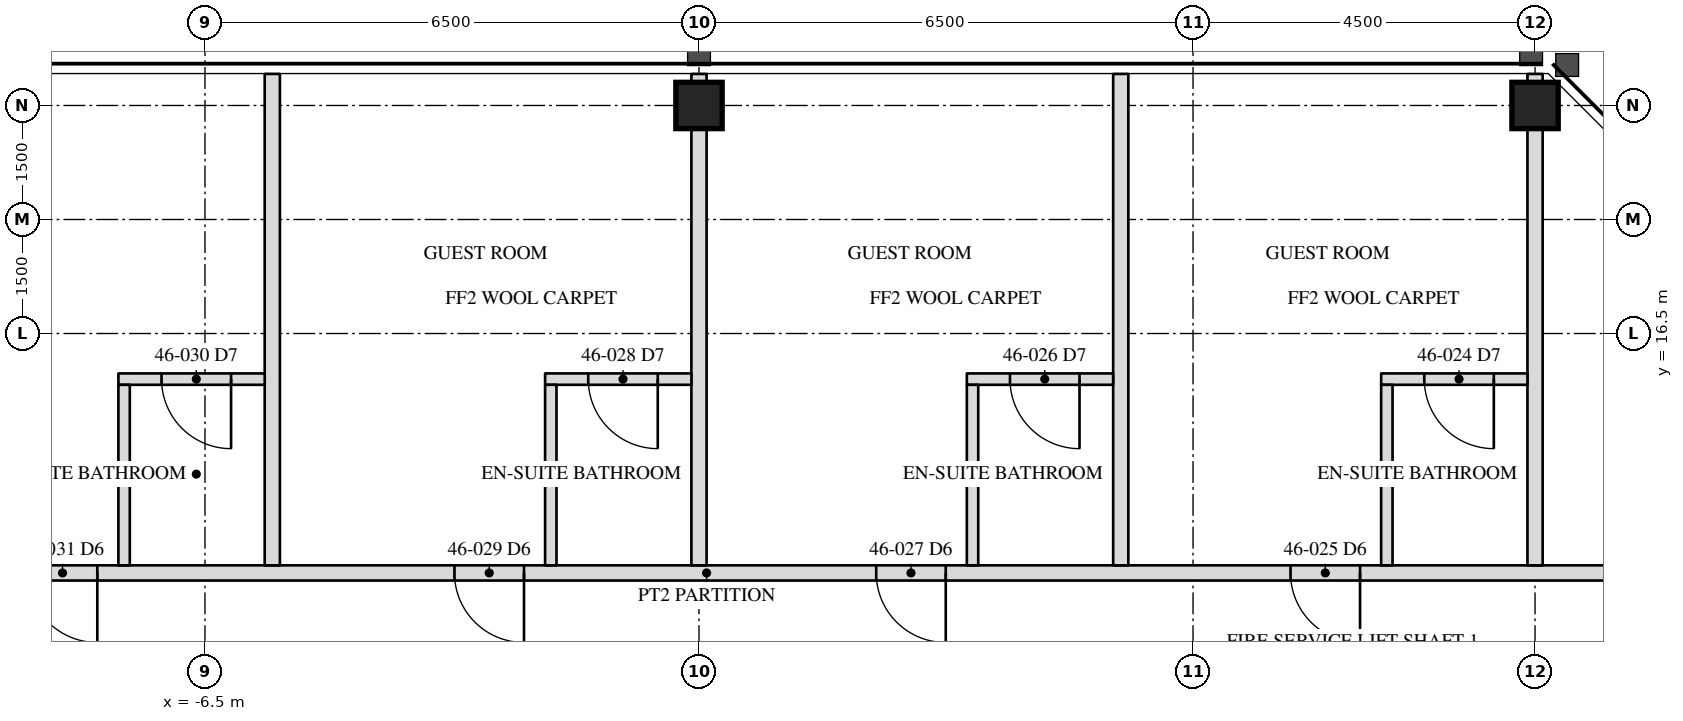
"""IFC4 building model, lengths in metres.
Left out: names, types, materials, properties, quantities, classifications, styles, units other than length and angle.
Written with IfcOpenShell. Run it as: python <this file> out.ifc"""

import sys

from ifc_helpers import new_model, si_unit, direction, frame, frame_2d, origin, origin_2d, place, context, subcontext, project, spatial, rectangle, hollow_rectangle, extrude, element, fill, save


model = new_model("IFC4")
c1 = context("Model", 3, precision=1e-05, world=origin(), true_north=direction((0.0, 1.0)))
c2 = subcontext(c1, "Body", "Model", "MODEL_VIEW")
j1 = project(units=[si_unit("LENGTHUNIT", "METRE"), si_unit("PLANEANGLEUNIT", "RADIAN")], contexts=[c1])
p1 = place(None, origin())
s1 = spatial("IfcSite", under=j1, at=p1, CompositionType="ELEMENT")
p2 = place(p1, origin())
s2 = spatial("IfcBuilding", under=s1, at=p2, CompositionType="ELEMENT")
p3 = place(p2, frame((0.0, 0.0, 197.7)))
s3 = spatial("IfcBuildingStorey", under=s2, at=p3, CompositionType="ELEMENT", Elevation=197.7)
for number, where, z_axis, x_axis in (
    (1, (11.0, 19.5, 0.0), (0.0, 0.0, 1.0), (1.0, 0.0, 0.0)),
    (2, (0.0, 19.5, 0.0), (0.0, 0.0, 1.0), (1.0, 0.0, 0.0)),
):
    element("IfcColumn", number, at=place(p3, frame(where, z_axis=z_axis, x_axis=x_axis)), inside=s3, PredefinedType="COLUMN", context=c2, shape_type="SweptSolid", body=[
        extrude(hollow_rectangle(XDim=0.61, YDim=0.61, WallThickness=0.076, at=origin_2d()), origin(), (0.0, 0.0, 1.0), 3.5),
    ])
p4 = place(p3, frame((13.45, 13.35, 0.0), z_axis=(0.0, 0.0, 1.0), x_axis=(-1.0, 0.0, 0.0)))
e3 = element("IfcWall", 3, at=p4, inside=s3, PredefinedType="PARTITIONING", context=c2, shape_type="SweptSolid", body=[
    extrude(rectangle(XDim=26.7, YDim=0.2, at=frame_2d((13.35, 0.0))), origin(), (0.0, 0.0, 1.0), 3.31),
])
p5 = place(p4, frame((4.752, 0.0, 0.0)))
e4 = element("IfcOpeningElement", 4, at=p5, cuts=e3, PredefinedType="OPENING", context=c2, shape_type="SweptSolid", body=[
    extrude(rectangle(XDim=0.915, YDim=2.134, at=frame_2d((0.458, 1.067))), frame((0.0, 0.11, 0.0), z_axis=(0.0, -1.0, 0.0), x_axis=(1.0, 0.0, 0.0)), (0.0, 0.0, 1.0), 0.22),
])
p6 = place(p4, frame((10.204, 0.0, 0.0)))
e5 = element("IfcOpeningElement", 5, at=p6, cuts=e3, PredefinedType="OPENING", context=c2, shape_type="SweptSolid", body=[
    extrude(rectangle(XDim=0.915, YDim=2.134, at=frame_2d((0.458, 1.067))), frame((0.0, 0.11, 0.0), z_axis=(0.0, -1.0, 0.0), x_axis=(1.0, 0.0, 0.0)), (0.0, 0.0, 1.0), 0.22),
])
p7 = place(p4, frame((15.752, 0.0, 0.0)))
e6 = element("IfcOpeningElement", 6, at=p7, cuts=e3, PredefinedType="OPENING", context=c2, shape_type="SweptSolid", body=[
    extrude(rectangle(XDim=0.915, YDim=2.134, at=frame_2d((0.458, 1.067))), frame((0.0, 0.11, 0.0), z_axis=(0.0, -1.0, 0.0), x_axis=(1.0, 0.0, 0.0)), (0.0, 0.0, 1.0), 0.22),
])
p8 = place(p4, frame((21.366, 0.0, 0.0)))
e7 = element("IfcOpeningElement", 7, at=p8, cuts=e3, PredefinedType="OPENING", context=c2, shape_type="SweptSolid", body=[
    extrude(rectangle(XDim=0.915, YDim=2.134, at=frame_2d((0.458, 1.067))), frame((0.0, 0.11, 0.0), z_axis=(0.0, -1.0, 0.0), x_axis=(1.0, 0.0, 0.0)), (0.0, 0.0, 1.0), 0.22),
])
p9 = place(p3, frame((11.0, 13.45, 0.0), z_axis=(0.0, 0.0, 1.0), x_axis=(0.0, 1.0, 0.0)))
e8 = element("IfcWall", 8, at=p9, inside=s3, PredefinedType="PARTITIONING", context=c2, shape_type="SweptSolid", body=[
    extrude(rectangle(XDim=6.465, YDim=0.2, at=frame_2d((3.232, 0.0))), origin(), (0.0, 0.0, 1.0), 2.802),
])
p10 = place(p3, frame((5.549, 13.45, 0.0), z_axis=(0.0, 0.0, 1.0), x_axis=(0.0, 1.0, 0.0)))
e9 = element("IfcWall", 9, at=p10, inside=s3, PredefinedType="PARTITIONING", context=c2, shape_type="SweptSolid", body=[
    extrude(rectangle(XDim=6.465, YDim=0.2, at=frame_2d((3.232, 0.0))), origin(), (0.0, 0.0, 1.0), 3.31),
])
p11 = place(p3, frame((0.0, 13.45, 0.0), z_axis=(0.0, 0.0, 1.0), x_axis=(0.0, 1.0, 0.0)))
e10 = element("IfcWall", 10, at=p11, inside=s3, PredefinedType="PARTITIONING", context=c2, shape_type="SweptSolid", body=[
    extrude(rectangle(XDim=6.465, YDim=0.2, at=frame_2d((3.232, 0.0))), origin(), (0.0, 0.0, 1.0), 2.802),
])
p12 = place(p3, frame((-5.614, 13.45, 0.0), z_axis=(0.0, 0.0, 1.0), x_axis=(0.0, 1.0, 0.0)))
e11 = element("IfcWall", 11, at=p12, inside=s3, PredefinedType="PARTITIONING", context=c2, shape_type="SweptSolid", body=[
    extrude(rectangle(XDim=6.465, YDim=0.2, at=frame_2d((3.232, 0.0))), origin(), (0.0, 0.0, 1.0), 3.31),
])
p13 = place(p3, frame((10.9, 15.9, 0.0), z_axis=(0.0, 0.0, 1.0), x_axis=(-1.0, 0.0, 0.0)))
e12 = element("IfcWall", 12, at=p13, inside=s3, PredefinedType="PARTITIONING", context=c2, shape_type="SweptSolid", body=[
    extrude(rectangle(XDim=1.925, YDim=0.15, at=frame_2d((0.962, 0.0))), origin(), (0.0, 0.0, 1.0), 3.31),
])
p14 = place(p13, frame((0.442, 0.0, 0.0)))
e13 = element("IfcOpeningElement", 13, at=p14, cuts=e12, PredefinedType="OPENING", context=c2, shape_type="SweptSolid", body=[
    extrude(rectangle(XDim=0.915, YDim=2.032, at=frame_2d((0.458, 1.016))), frame((0.0, 0.085, 0.0), z_axis=(0.0, -1.0, 0.0), x_axis=(1.0, 0.0, 0.0)), (0.0, 0.0, 1.0), 0.17),
])
p15 = place(p3, frame((9.05, 13.45, 0.0), z_axis=(0.0, 0.0, 1.0), x_axis=(0.0, 1.0, 0.0)))
e14 = element("IfcWall", 14, at=p15, inside=s3, PredefinedType="PARTITIONING", context=c2, shape_type="SweptSolid", body=[
    extrude(rectangle(XDim=2.375, YDim=0.15, at=frame_2d((1.188, 0.0))), origin(), (0.0, 0.0, 1.0), 3.31),
])
p16 = place(p3, frame((5.449, 15.9, 0.0), z_axis=(0.0, 0.0, 1.0), x_axis=(-1.0, 0.0, 0.0)))
e15 = element("IfcWall", 15, at=p16, inside=s3, PredefinedType="PARTITIONING", context=c2, shape_type="SweptSolid", body=[
    extrude(rectangle(XDim=1.925, YDim=0.15, at=frame_2d((0.962, 0.0))), origin(), (0.0, 0.0, 1.0), 3.31),
])
p17 = place(p16, frame((0.442, 0.0, 0.0)))
e16 = element("IfcOpeningElement", 16, at=p17, cuts=e15, PredefinedType="OPENING", context=c2, shape_type="SweptSolid", body=[
    extrude(rectangle(XDim=0.915, YDim=2.032, at=frame_2d((0.458, 1.016))), frame((0.0, 0.085, 0.0), z_axis=(0.0, -1.0, 0.0), x_axis=(1.0, 0.0, 0.0)), (0.0, 0.0, 1.0), 0.17),
])
p18 = place(p3, frame((3.599, 13.45, 0.0), z_axis=(0.0, 0.0, 1.0), x_axis=(0.0, 1.0, 0.0)))
e17 = element("IfcWall", 17, at=p18, inside=s3, PredefinedType="PARTITIONING", context=c2, shape_type="SweptSolid", body=[
    extrude(rectangle(XDim=2.375, YDim=0.15, at=frame_2d((1.188, 0.0))), origin(), (0.0, 0.0, 1.0), 2.703),
])
p19 = place(p3, frame((-0.1, 15.9, 0.0), z_axis=(0.0, 0.0, 1.0), x_axis=(-1.0, 0.0, 0.0)))
e18 = element("IfcWall", 18, at=p19, inside=s3, PredefinedType="PARTITIONING", context=c2, shape_type="SweptSolid", body=[
    extrude(rectangle(XDim=1.925, YDim=0.15, at=frame_2d((0.962, 0.0))), origin(), (0.0, 0.0, 1.0), 3.31),
])
p20 = place(p19, frame((0.442, 0.0, 0.0)))
e19 = element("IfcOpeningElement", 19, at=p20, cuts=e18, PredefinedType="OPENING", context=c2, shape_type="SweptSolid", body=[
    extrude(rectangle(XDim=0.915, YDim=2.032, at=frame_2d((0.458, 1.016))), frame((0.0, 0.085, 0.0), z_axis=(0.0, -1.0, 0.0), x_axis=(1.0, 0.0, 0.0)), (0.0, 0.0, 1.0), 0.17),
])
p21 = place(p3, frame((-1.95, 13.45, 0.0), z_axis=(0.0, 0.0, 1.0), x_axis=(0.0, 1.0, 0.0)))
e20 = element("IfcWall", 20, at=p21, inside=s3, PredefinedType="PARTITIONING", context=c2, shape_type="SweptSolid", body=[
    extrude(rectangle(XDim=2.375, YDim=0.15, at=frame_2d((1.188, 0.0))), origin(), (0.0, 0.0, 1.0), 3.31),
])
p22 = place(p3, frame((-5.714, 15.9, 0.0), z_axis=(0.0, 0.0, 1.0), x_axis=(-1.0, 0.0, 0.0)))
e21 = element("IfcWall", 21, at=p22, inside=s3, PredefinedType="PARTITIONING", context=c2, shape_type="SweptSolid", body=[
    extrude(rectangle(XDim=1.925, YDim=0.15, at=frame_2d((0.962, 0.0))), origin(), (0.0, 0.0, 1.0), 3.31),
])
p23 = place(p22, frame((0.442, 0.0, 0.0)))
e22 = element("IfcOpeningElement", 22, at=p23, cuts=e21, PredefinedType="OPENING", context=c2, shape_type="SweptSolid", body=[
    extrude(rectangle(XDim=0.915, YDim=2.032, at=frame_2d((0.458, 1.016))), frame((0.0, 0.085, 0.0), z_axis=(0.0, -1.0, 0.0), x_axis=(1.0, 0.0, 0.0)), (0.0, 0.0, 1.0), 0.17),
])
p24 = place(p3, frame((-7.564, 13.45, 0.0), z_axis=(0.0, 0.0, 1.0), x_axis=(0.0, 1.0, 0.0)))
e23 = element("IfcWall", 23, at=p24, inside=s3, PredefinedType="PARTITIONING", context=c2, shape_type="SweptSolid", body=[
    extrude(rectangle(XDim=2.375, YDim=0.15, at=frame_2d((1.188, 0.0))), origin(), (0.0, 0.0, 1.0), 3.31),
])
p25 = place(p14, origin())
e24 = element("IfcDoor", 24, at=p25, inside=s3, OperationType="SINGLE_SWING_LEFT", PredefinedType="DOOR", context=c2, shape_type="SweptSolid", body=[
    extrude(rectangle(XDim=0.915, YDim=2.032, at=frame_2d((0.458, 1.016))), frame((0.0, 0.025, 0.0), z_axis=(0.0, -1.0, 0.0), x_axis=(1.0, 0.0, 0.0)), (0.0, 0.0, 1.0), 0.05),
])
fill(e13, e24)
p26 = place(p5, origin())
e25 = element("IfcDoor", 25, at=p26, inside=s3, OperationType="SINGLE_SWING_LEFT", PredefinedType="DOOR", context=c2, shape_type="SweptSolid", body=[
    extrude(rectangle(XDim=0.915, YDim=2.134, at=frame_2d((0.458, 1.067))), frame((0.0, 0.025, 0.0), z_axis=(0.0, -1.0, 0.0), x_axis=(1.0, 0.0, 0.0)), (0.0, 0.0, 1.0), 0.05),
])
fill(e4, e25)
p27 = place(p17, origin())
e26 = element("IfcDoor", 26, at=p27, inside=s3, OperationType="SINGLE_SWING_LEFT", PredefinedType="DOOR", context=c2, shape_type="SweptSolid", body=[
    extrude(rectangle(XDim=0.915, YDim=2.032, at=frame_2d((0.458, 1.016))), frame((0.0, 0.025, 0.0), z_axis=(0.0, -1.0, 0.0), x_axis=(1.0, 0.0, 0.0)), (0.0, 0.0, 1.0), 0.05),
])
fill(e16, e26)
p28 = place(p6, origin())
e27 = element("IfcDoor", 27, at=p28, inside=s3, OperationType="SINGLE_SWING_LEFT", PredefinedType="DOOR", context=c2, shape_type="SweptSolid", body=[
    extrude(rectangle(XDim=0.915, YDim=2.134, at=frame_2d((0.458, 1.067))), frame((0.0, 0.025, 0.0), z_axis=(0.0, -1.0, 0.0), x_axis=(1.0, 0.0, 0.0)), (0.0, 0.0, 1.0), 0.05),
])
fill(e5, e27)
p29 = place(p20, origin())
e28 = element("IfcDoor", 28, at=p29, inside=s3, OperationType="SINGLE_SWING_LEFT", PredefinedType="DOOR", context=c2, shape_type="SweptSolid", body=[
    extrude(rectangle(XDim=0.915, YDim=2.032, at=frame_2d((0.458, 1.016))), frame((0.0, 0.025, 0.0), z_axis=(0.0, -1.0, 0.0), x_axis=(1.0, 0.0, 0.0)), (0.0, 0.0, 1.0), 0.05),
])
fill(e19, e28)
p30 = place(p7, origin())
e29 = element("IfcDoor", 29, at=p30, inside=s3, OperationType="SINGLE_SWING_LEFT", PredefinedType="DOOR", context=c2, shape_type="SweptSolid", body=[
    extrude(rectangle(XDim=0.915, YDim=2.134, at=frame_2d((0.458, 1.067))), frame((0.0, 0.025, 0.0), z_axis=(0.0, -1.0, 0.0), x_axis=(1.0, 0.0, 0.0)), (0.0, 0.0, 1.0), 0.05),
])
fill(e6, e29)
p31 = place(p23, origin())
e30 = element("IfcDoor", 30, at=p31, inside=s3, OperationType="SINGLE_SWING_LEFT", PredefinedType="DOOR", context=c2, shape_type="SweptSolid", body=[
    extrude(rectangle(XDim=0.915, YDim=2.032, at=frame_2d((0.458, 1.016))), frame((0.0, 0.025, 0.0), z_axis=(0.0, -1.0, 0.0), x_axis=(1.0, 0.0, 0.0)), (0.0, 0.0, 1.0), 0.05),
])
fill(e22, e30)
p32 = place(p8, origin())
e31 = element("IfcDoor", 31, at=p32, inside=s3, OperationType="SINGLE_SWING_LEFT", PredefinedType="DOOR", context=c2, shape_type="SweptSolid", body=[
    extrude(rectangle(XDim=0.915, YDim=2.134, at=frame_2d((0.458, 1.067))), frame((0.0, 0.025, 0.0), z_axis=(0.0, -1.0, 0.0), x_axis=(1.0, 0.0, 0.0)), (0.0, 0.0, 1.0), 0.05),
])
fill(e7, e31)
save(model, sys.argv[1])
